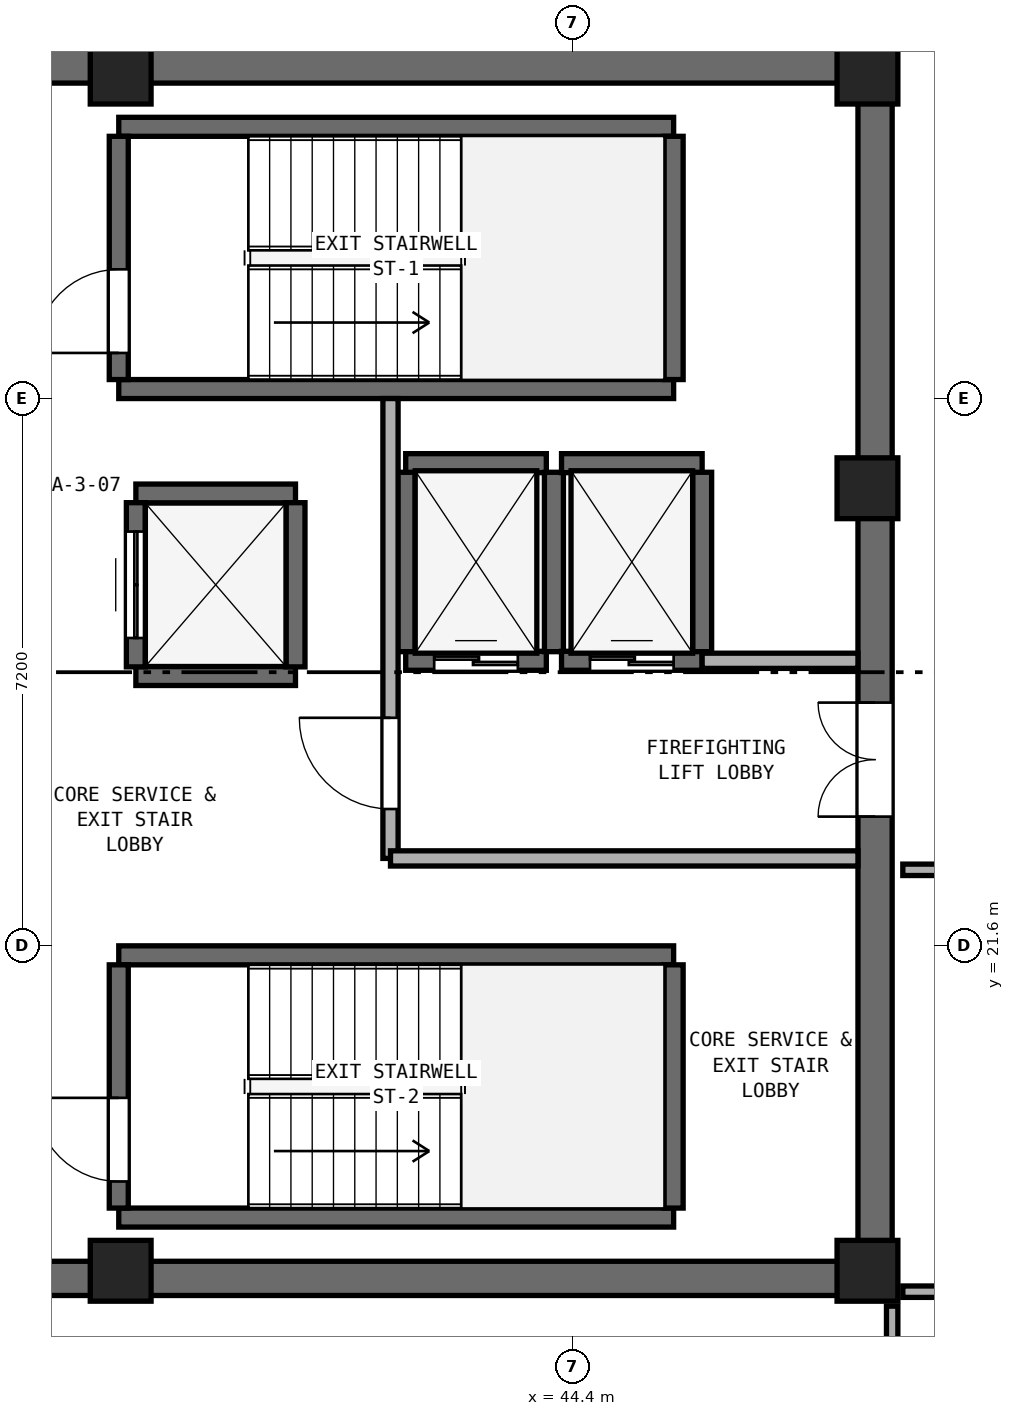
"""IFC4 building model, lengths in metres.
Left out: names, types, materials, properties, quantities, classifications, styles, units other than length and angle.
Written with IfcOpenShell. Run it as: python <this file> out.ifc"""

import sys

from ifc_helpers import new_model, si_unit, direction, frame, frame_2d, origin, origin_2d, place, context, subcontext, project, spatial, rectangle, extrude, element, fill, save


model = new_model("IFC4")
c1 = context("Model", 3, precision=1e-05, world=origin(), true_north=direction((0.0, 1.0)))
c2 = subcontext(c1, "Body", "Model", "MODEL_VIEW")
j1 = project(units=[si_unit("LENGTHUNIT", "METRE"), si_unit("PLANEANGLEUNIT", "RADIAN")], contexts=[c1])
p1 = place(None, origin())
s1 = spatial("IfcSite", under=j1, at=p1, CompositionType="ELEMENT")
p2 = place(p1, origin())
s2 = spatial("IfcBuilding", under=s1, at=p2, CompositionType="ELEMENT")
p3 = place(p2, frame((0.0, 0.0, 293.4)))
s3 = spatial("IfcBuildingStorey", under=s2, at=p3, CompositionType="ELEMENT", Elevation=293.4)
for number, where, z_axis, x_axis in (
    (1, (25.4, 17.225, 0.0), (0.0, 0.0, 1.0), (1.0, 0.0, 0.0)),
    (2, (25.4, 33.175, 0.0), (0.0, 0.0, 1.0), (1.0, 0.0, 0.0)),
):
    element("IfcWall", number, at=place(p3, frame(where, z_axis=z_axis, x_axis=x_axis)), inside=s3, PredefinedType="SHEAR", context=c2, shape_type="SweptSolid", body=[
        extrude(rectangle(XDim=23.2, YDim=0.45, at=frame_2d((11.6, 0.0))), origin(), (0.0, 0.0, 1.0), 3.54),
    ])
p4 = place(p3, frame((48.375, 17.45, 0.0), z_axis=(0.0, 0.0, 1.0), x_axis=(0.0, 1.0, 0.0)))
e3 = element("IfcWall", 3, at=p4, inside=s3, PredefinedType="SHEAR", context=c2, shape_type="SweptSolid", body=[
    extrude(rectangle(XDim=15.5, YDim=0.45, at=frame_2d((7.75, 0.0))), origin(), (0.0, 0.0, 1.0), 3.54),
])
p5 = place(p4, frame((5.85, 0.0, 0.0)))
e4 = element("IfcOpeningElement", 4, at=p5, cuts=e3, PredefinedType="OPENING", context=c2, shape_type="SweptSolid", body=[
    extrude(rectangle(XDim=1.5, YDim=2.15, at=frame_2d((0.75, 1.075))), frame((0.0, 0.235, 0.0), z_axis=(0.0, -1.0, 0.0), x_axis=(1.0, 0.0, 0.0)), (0.0, 0.0, 1.0), 0.47),
])
for number, where, z_axis, x_axis in (
    (5, (38.45, 17.325, 0.0), (0.0, 0.0, 1.0), (1.0, 0.0, 0.0)),
    (6, (48.275, 17.325, 0.0), (0.0, 0.0, 1.0), (1.0, 0.0, 0.0)),
    (7, (48.275, 27.62, 0.0), (0.0, 0.0, 1.0), (1.0, 0.0, 0.0)),
    (8, (48.275, 33.075, 0.0), (0.0, 0.0, 1.0), (1.0, 0.0, 0.0)),
    (9, (38.45, 33.075, 0.0), (0.0, 0.0, 1.0), (1.0, 0.0, 0.0)),
):
    element("IfcColumn", number, at=place(p3, frame(where, z_axis=z_axis, x_axis=x_axis)), inside=s3, PredefinedType="PILASTER", context=c2, shape_type="SweptSolid", body=[
        extrude(rectangle(XDim=0.8, YDim=0.8, at=origin_2d()), origin(), (0.0, 0.0, 1.0), 3.8),
    ])
for number, where, z_axis, x_axis in (
    (10, (38.425, 28.925, 0.0), (0.0, 0.0, 1.0), (1.0, 0.0, 0.0)),
    (11, (38.425, 32.375, 0.0), (0.0, 0.0, 1.0), (1.0, 0.0, 0.0)),
):
    element("IfcWall", number, at=place(p3, frame(where, z_axis=z_axis, x_axis=x_axis)), inside=s3, PredefinedType="SHEAR", context=c2, shape_type="SweptSolid", body=[
        extrude(rectangle(XDim=7.3, YDim=0.25, at=frame_2d((3.65, 0.0))), origin(), (0.0, 0.0, 1.0), 3.54),
    ])
p6 = place(p3, frame((38.425, 29.05, 0.0), z_axis=(0.0, 0.0, 1.0), x_axis=(0.0, 1.0, 0.0)))
e12 = element("IfcWall", 12, at=p6, inside=s3, PredefinedType="SHEAR", context=c2, shape_type="SweptSolid", body=[
    extrude(rectangle(XDim=3.2, YDim=0.25, at=frame_2d((1.6, 0.0))), origin(), (0.0, 0.0, 1.0), 3.54),
])
p7 = place(p6, frame((0.35, 0.0, 0.0)))
e13 = element("IfcOpeningElement", 13, at=p7, cuts=e12, PredefinedType="OPENING", context=c2, shape_type="SweptSolid", body=[
    extrude(rectangle(XDim=1.1, YDim=2.15, at=frame_2d((0.55, 1.075))), frame((0.0, 0.135, 0.0), z_axis=(0.0, -1.0, 0.0), x_axis=(1.0, 0.0, 0.0)), (0.0, 0.0, 1.0), 0.27),
])
p8 = place(p3, frame((45.725, 29.05, 0.0), z_axis=(0.0, 0.0, 1.0), x_axis=(0.0, 1.0, 0.0)))
e14 = element("IfcWall", 14, at=p8, inside=s3, PredefinedType="SHEAR", context=c2, shape_type="SweptSolid", body=[
    extrude(rectangle(XDim=3.2, YDim=0.25, at=frame_2d((1.6, 0.0))), origin(), (0.0, 0.0, 1.0), 3.54),
])
for number, where, z_axis, x_axis in (
    (15, (38.425, 18.025, 0.0), (0.0, 0.0, 1.0), (1.0, 0.0, 0.0)),
    (16, (38.425, 21.475, 0.0), (0.0, 0.0, 1.0), (1.0, 0.0, 0.0)),
):
    element("IfcWall", number, at=place(p3, frame(where, z_axis=z_axis, x_axis=x_axis)), inside=s3, PredefinedType="SHEAR", context=c2, shape_type="SweptSolid", body=[
        extrude(rectangle(XDim=7.3, YDim=0.25, at=frame_2d((3.65, 0.0))), origin(), (0.0, 0.0, 1.0), 3.54),
    ])
p9 = place(p3, frame((38.425, 18.15, 0.0), z_axis=(0.0, 0.0, 1.0), x_axis=(0.0, 1.0, 0.0)))
e17 = element("IfcWall", 17, at=p9, inside=s3, PredefinedType="SHEAR", context=c2, shape_type="SweptSolid", body=[
    extrude(rectangle(XDim=3.2, YDim=0.25, at=frame_2d((1.6, 0.0))), origin(), (0.0, 0.0, 1.0), 3.54),
])
p10 = place(p9, frame((0.35, 0.0, 0.0)))
e18 = element("IfcOpeningElement", 18, at=p10, cuts=e17, PredefinedType="OPENING", context=c2, shape_type="SweptSolid", body=[
    extrude(rectangle(XDim=1.1, YDim=2.15, at=frame_2d((0.55, 1.075))), frame((0.0, 0.135, 0.0), z_axis=(0.0, -1.0, 0.0), x_axis=(1.0, 0.0, 0.0)), (0.0, 0.0, 1.0), 0.27),
])
p11 = place(p3, frame((45.725, 18.15, 0.0), z_axis=(0.0, 0.0, 1.0), x_axis=(0.0, 1.0, 0.0)))
e19 = element("IfcWall", 19, at=p11, inside=s3, PredefinedType="SHEAR", context=c2, shape_type="SweptSolid", body=[
    extrude(rectangle(XDim=3.2, YDim=0.25, at=frame_2d((1.6, 0.0))), origin(), (0.0, 0.0, 1.0), 3.54),
])
p12 = place(p3, frame((42.2, 25.35, 0.0), z_axis=(0.0, 0.0, 1.0), x_axis=(1.0, 0.0, 0.0)))
e20 = element("IfcWall", 20, at=p12, inside=s3, PredefinedType="SHEAR", context=c2, shape_type="SweptSolid", body=[
    extrude(rectangle(XDim=1.85, YDim=0.25, at=frame_2d((0.925, 0.0))), origin(), (0.0, 0.0, 1.0), 3.54),
])
p13 = place(p12, frame((0.375, 0.0, 0.0)))
e21 = element("IfcOpeningElement", 21, at=p13, cuts=e20, PredefinedType="OPENING", context=c2, shape_type="SweptSolid", body=[
    extrude(rectangle(XDim=1.1, YDim=2.15, at=frame_2d((0.55, 1.075))), frame((0.0, 0.135, 0.0), z_axis=(0.0, -1.0, 0.0), x_axis=(1.0, 0.0, 0.0)), (0.0, 0.0, 1.0), 0.27),
])
p14 = place(p3, frame((42.2, 27.95, 0.0), z_axis=(0.0, 0.0, 1.0), x_axis=(1.0, 0.0, 0.0)))
e22 = element("IfcWall", 22, at=p14, inside=s3, PredefinedType="SHEAR", context=c2, shape_type="SweptSolid", body=[
    extrude(rectangle(XDim=1.85, YDim=0.25, at=frame_2d((0.925, 0.0))), origin(), (0.0, 0.0, 1.0), 3.54),
])
for number, where, z_axis, x_axis in (
    (23, (42.2, 25.47, 0.0), (0.0, 0.0, 1.0), (0.0, 1.0, 0.0)),
    (24, (44.15, 25.47, 0.0), (0.0, 0.0, 1.0), (0.0, 1.0, 0.0)),
):
    element("IfcWall", number, at=place(p3, frame(where, z_axis=z_axis, x_axis=x_axis)), inside=s3, PredefinedType="SHEAR", context=c2, shape_type="SweptSolid", body=[
        extrude(rectangle(XDim=2.36, YDim=0.25, at=frame_2d((1.18, 0.0))), origin(), (0.0, 0.0, 1.0), 3.54),
    ])
p15 = place(p3, frame((44.25, 25.35, 0.0), z_axis=(0.0, 0.0, 1.0), x_axis=(1.0, 0.0, 0.0)))
e25 = element("IfcWall", 25, at=p15, inside=s3, PredefinedType="SHEAR", context=c2, shape_type="SweptSolid", body=[
    extrude(rectangle(XDim=1.85, YDim=0.25, at=frame_2d((0.925, 0.0))), origin(), (0.0, 0.0, 1.0), 3.54),
])
p16 = place(p15, frame((0.375, 0.0, 0.0)))
e26 = element("IfcOpeningElement", 26, at=p16, cuts=e25, PredefinedType="OPENING", context=c2, shape_type="SweptSolid", body=[
    extrude(rectangle(XDim=1.1, YDim=2.15, at=frame_2d((0.55, 1.075))), frame((0.0, 0.135, 0.0), z_axis=(0.0, -1.0, 0.0), x_axis=(1.0, 0.0, 0.0)), (0.0, 0.0, 1.0), 0.27),
])
p17 = place(p3, frame((44.25, 27.95, 0.0), z_axis=(0.0, 0.0, 1.0), x_axis=(1.0, 0.0, 0.0)))
e27 = element("IfcWall", 27, at=p17, inside=s3, PredefinedType="SHEAR", context=c2, shape_type="SweptSolid", body=[
    extrude(rectangle(XDim=1.85, YDim=0.25, at=frame_2d((0.925, 0.0))), origin(), (0.0, 0.0, 1.0), 3.54),
])
p18 = place(p3, frame((46.1, 25.47, 0.0), z_axis=(0.0, 0.0, 1.0), x_axis=(0.0, 1.0, 0.0)))
e28 = element("IfcWall", 28, at=p18, inside=s3, PredefinedType="SHEAR", context=c2, shape_type="SweptSolid", body=[
    extrude(rectangle(XDim=2.36, YDim=0.25, at=frame_2d((1.18, 0.0))), origin(), (0.0, 0.0, 1.0), 3.54),
])
for number, where, z_axis, x_axis in (
    (29, (38.65, 25.15, 0.0), (0.0, 0.0, 1.0), (1.0, 0.0, 0.0)),
    (30, (38.65, 27.55, 0.0), (0.0, 0.0, 1.0), (1.0, 0.0, 0.0)),
):
    element("IfcWall", number, at=place(p3, frame(where, z_axis=z_axis, x_axis=x_axis)), inside=s3, PredefinedType="SHEAR", context=c2, shape_type="SweptSolid", body=[
        extrude(rectangle(XDim=2.1, YDim=0.25, at=frame_2d((1.05, 0.0))), origin(), (0.0, 0.0, 1.0), 3.54),
    ])
p19 = place(p3, frame((38.65, 25.27, 0.0), z_axis=(0.0, 0.0, 1.0), x_axis=(0.0, 1.0, 0.0)))
e31 = element("IfcWall", 31, at=p19, inside=s3, PredefinedType="SHEAR", context=c2, shape_type="SweptSolid", body=[
    extrude(rectangle(XDim=2.16, YDim=0.25, at=frame_2d((1.08, 0.0))), origin(), (0.0, 0.0, 1.0), 3.54),
])
p20 = place(p19, frame((0.38, 0.0, 0.0)))
e32 = element("IfcOpeningElement", 32, at=p20, cuts=e31, PredefinedType="OPENING", context=c2, shape_type="SweptSolid", body=[
    extrude(rectangle(XDim=1.4, YDim=2.2, at=frame_2d((0.7, 1.1))), frame((0.0, 0.135, 0.0), z_axis=(0.0, -1.0, 0.0), x_axis=(1.0, 0.0, 0.0)), (0.0, 0.0, 1.0), 0.27),
])
p21 = place(p3, frame((40.75, 25.27, 0.0), z_axis=(0.0, 0.0, 1.0), x_axis=(0.0, 1.0, 0.0)))
e33 = element("IfcWall", 33, at=p21, inside=s3, PredefinedType="SHEAR", context=c2, shape_type="SweptSolid", body=[
    extrude(rectangle(XDim=2.16, YDim=0.25, at=frame_2d((1.08, 0.0))), origin(), (0.0, 0.0, 1.0), 3.54),
])
p22 = place(p3, frame((42.0, 22.75, 0.0), z_axis=(0.0, 0.0, 1.0), x_axis=(0.0, 1.0, 0.0)))
e34 = element("IfcWall", 34, at=p22, inside=s3, PredefinedType="SOLIDWALL", context=c2, shape_type="SweptSolid", body=[
    extrude(rectangle(XDim=6.05, YDim=0.2, at=frame_2d((3.025, 0.0))), origin(), (0.0, 0.0, 1.0), 3.54),
])
p23 = place(p22, frame((0.65, 0.0, 0.0)))
e35 = element("IfcOpeningElement", 35, at=p23, cuts=e34, PredefinedType="OPENING", context=c2, shape_type="SweptSolid", body=[
    extrude(rectangle(XDim=1.2, YDim=2.15, at=frame_2d((0.6, 1.075))), frame((0.0, 0.11, 0.0), z_axis=(0.0, -1.0, 0.0), x_axis=(1.0, 0.0, 0.0)), (0.0, 0.0, 1.0), 0.22),
])
p24 = place(p3, frame((42.0, 22.75, 0.0), z_axis=(0.0, 0.0, 1.0), x_axis=(1.0, 0.0, 0.0)))
e36 = element("IfcWall", 36, at=p24, inside=s3, PredefinedType="SOLIDWALL", context=c2, shape_type="SweptSolid", body=[
    extrude(rectangle(XDim=6.15, YDim=0.2, at=frame_2d((3.075, 0.0))), origin(), (0.0, 0.0, 1.0), 3.54),
])
p25 = place(p3, frame((46.1, 25.35, 0.0), z_axis=(0.0, 0.0, 1.0), x_axis=(1.0, 0.0, 0.0)))
e37 = element("IfcWall", 37, at=p25, inside=s3, PredefinedType="SOLIDWALL", context=c2, shape_type="SweptSolid", body=[
    extrude(rectangle(XDim=2.05, YDim=0.2, at=frame_2d((1.025, 0.0))), origin(), (0.0, 0.0, 1.0), 3.54),
])
p26 = place(p3, frame((48.6, 13.4, 0.0), z_axis=(0.0, 0.0, 1.0), x_axis=(0.0, 1.0, 0.0)))
e38 = element("IfcWall", 38, at=p26, inside=s3, PredefinedType="PARTITIONING", context=c2, shape_type="SweptSolid", body=[
    extrude(rectangle(XDim=3.46, YDim=0.15, at=frame_2d((1.73, 0.0))), origin(), (0.0, 0.0, 1.0), 3.54),
])
p27 = place(p3, frame((48.74, 17.05, 0.0), z_axis=(0.0, 0.0, 1.0), x_axis=(1.0, 0.0, 0.0)))
e39 = element("IfcWall", 39, at=p27, inside=s3, PredefinedType="PARTITIONING", context=c2, shape_type="SweptSolid", body=[
    extrude(rectangle(XDim=13.655, YDim=0.15, at=frame_2d((6.828, 0.0))), origin(), (0.0, 0.0, 1.0), 2.923),
])
p28 = place(p3, frame((48.74, 22.6, 0.0), z_axis=(0.0, 0.0, 1.0), x_axis=(1.0, 0.0, 0.0)))
e40 = element("IfcWall", 40, at=p28, inside=s3, PredefinedType="PARTITIONING", context=c2, shape_type="SweptSolid", body=[
    extrude(rectangle(XDim=3.46, YDim=0.15, at=frame_2d((1.73, 0.0))), origin(), (0.0, 0.0, 1.0), 3.54),
])
p29 = place(p7, origin())
e41 = element("IfcDoor", 41, at=p29, inside=s3, OperationType="SINGLE_SWING_LEFT", PredefinedType="DOOR", context=c2, shape_type="SweptSolid", body=[
    extrude(rectangle(XDim=1.1, YDim=2.15, at=frame_2d((0.55, 1.075))), frame((0.0, 0.025, 0.0), z_axis=(0.0, -1.0, 0.0), x_axis=(1.0, 0.0, 0.0)), (0.0, 0.0, 1.0), 0.05),
])
fill(e13, e41)
p30 = place(p10, origin())
e42 = element("IfcDoor", 42, at=p30, inside=s3, OperationType="SINGLE_SWING_RIGHT", PredefinedType="DOOR", context=c2, shape_type="SweptSolid", body=[
    extrude(rectangle(XDim=1.1, YDim=2.15, at=frame_2d((0.55, 1.075))), frame((0.0, 0.025, 0.0), z_axis=(0.0, -1.0, 0.0), x_axis=(1.0, 0.0, 0.0)), (0.0, 0.0, 1.0), 0.05),
])
fill(e18, e42)
p31 = place(p13, origin())
e43 = element("IfcDoor", 43, at=p31, inside=s3, OperationType="DOUBLE_DOOR_SLIDING", PredefinedType="DOOR", context=c2, shape_type="SweptSolid", body=[
    extrude(rectangle(XDim=1.1, YDim=2.15, at=frame_2d((0.55, 1.075))), frame((0.0, 0.025, 0.0), z_axis=(0.0, -1.0, 0.0), x_axis=(1.0, 0.0, 0.0)), (0.0, 0.0, 1.0), 0.05),
])
fill(e21, e43)
p32 = place(p16, origin())
e44 = element("IfcDoor", 44, at=p32, inside=s3, OperationType="DOUBLE_DOOR_SLIDING", PredefinedType="DOOR", context=c2, shape_type="SweptSolid", body=[
    extrude(rectangle(XDim=1.1, YDim=2.15, at=frame_2d((0.55, 1.075))), frame((0.0, 0.025, 0.0), z_axis=(0.0, -1.0, 0.0), x_axis=(1.0, 0.0, 0.0)), (0.0, 0.0, 1.0), 0.05),
])
fill(e26, e44)
p33 = place(p20, origin())
e45 = element("IfcDoor", 45, at=p33, inside=s3, OperationType="DOUBLE_DOOR_SLIDING", PredefinedType="DOOR", context=c2, shape_type="SweptSolid", body=[
    extrude(rectangle(XDim=1.4, YDim=2.2, at=frame_2d((0.7, 1.1))), frame((0.0, 0.025, 0.0), z_axis=(0.0, -1.0, 0.0), x_axis=(1.0, 0.0, 0.0)), (0.0, 0.0, 1.0), 0.05),
])
fill(e32, e45)
p34 = place(p23, origin())
e46 = element("IfcDoor", 46, at=p34, inside=s3, OperationType="SINGLE_SWING_RIGHT", PredefinedType="DOOR", context=c2, shape_type="SweptSolid", body=[
    extrude(rectangle(XDim=1.2, YDim=2.15, at=frame_2d((0.6, 1.075))), frame((0.0, 0.025, 0.0), z_axis=(0.0, -1.0, 0.0), x_axis=(1.0, 0.0, 0.0)), (0.0, 0.0, 1.0), 0.05),
])
fill(e35, e46)
p35 = place(p5, origin())
e47 = element("IfcDoor", 47, at=p35, inside=s3, OperationType="DOUBLE_DOOR_SINGLE_SWING", PredefinedType="DOOR", context=c2, shape_type="SweptSolid", body=[
    extrude(rectangle(XDim=1.5, YDim=2.15, at=frame_2d((0.75, 1.075))), frame((0.0, 0.025, 0.0), z_axis=(0.0, -1.0, 0.0), x_axis=(1.0, 0.0, 0.0)), (0.0, 0.0, 1.0), 0.05),
])
fill(e4, e47)
save(model, sys.argv[1])
